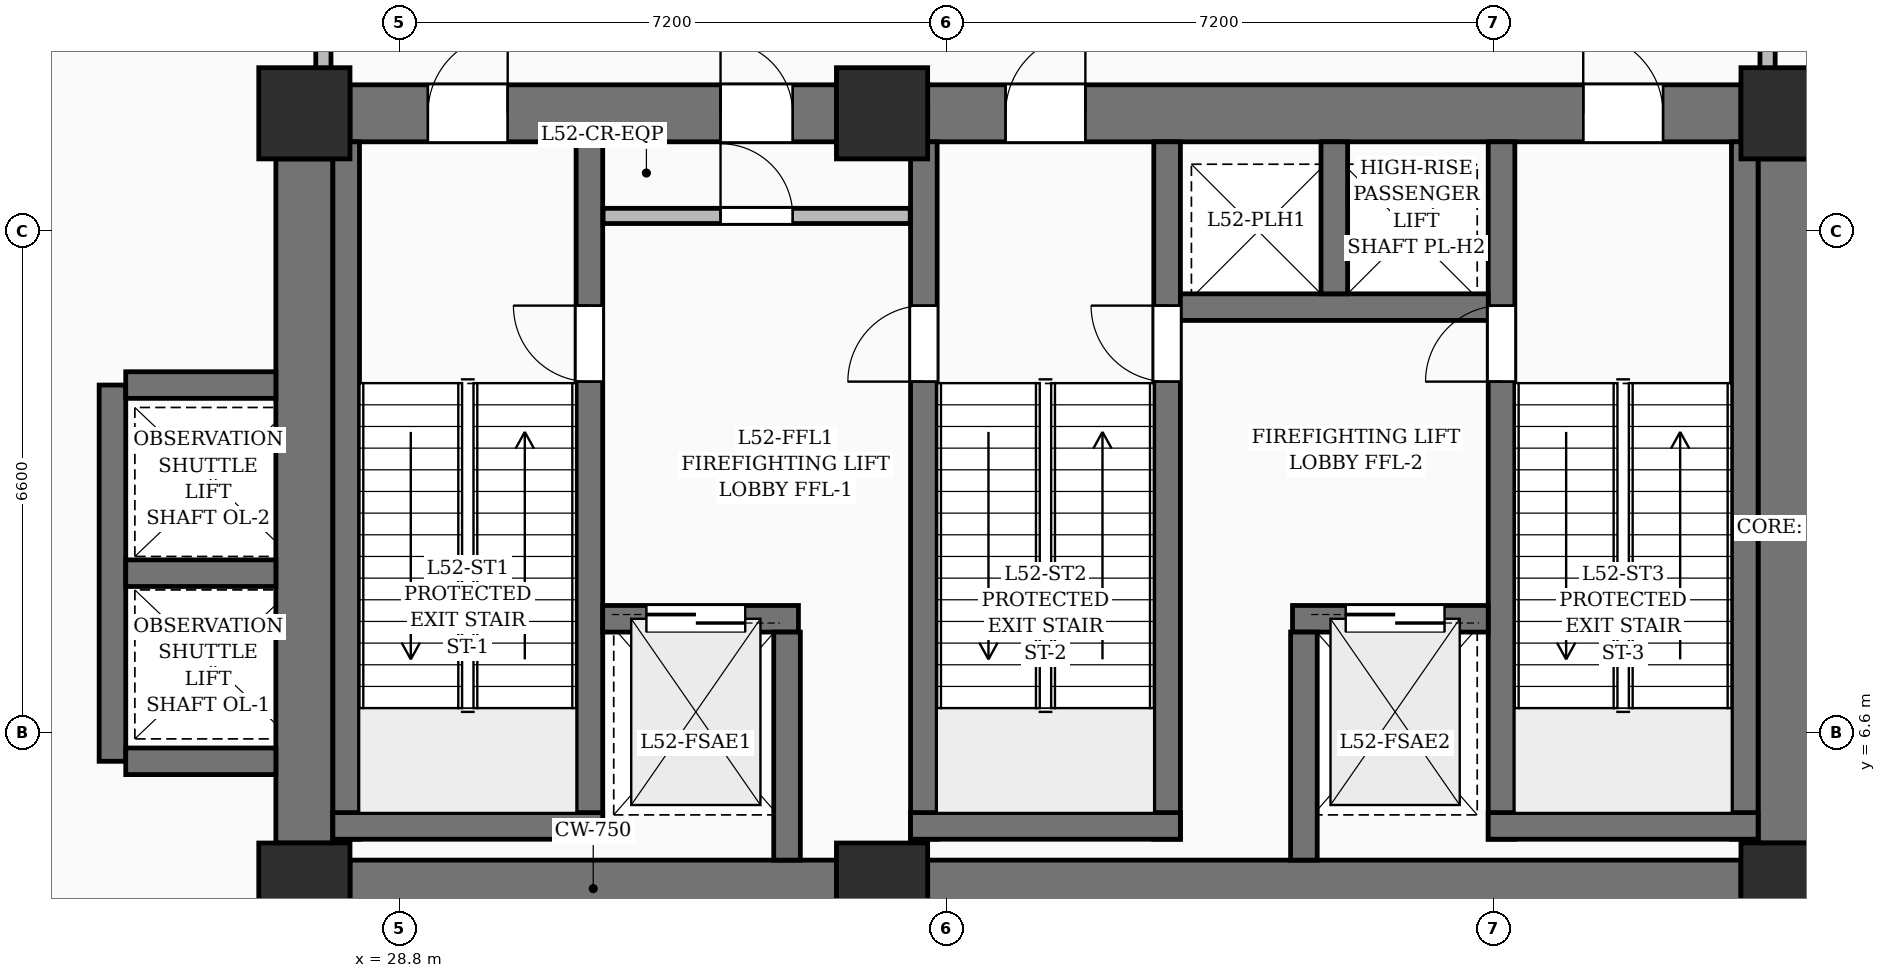
"""IFC4 building model, lengths in metres.
Left out: names, types, materials, properties, quantities, classifications, styles, units other than length and angle.
Written with IfcOpenShell. Run it as: python <this file> out.ifc"""

import sys

from ifc_helpers import new_model, si_unit, direction, frame, frame_2d, origin, origin_2d, place, context, subcontext, project, spatial, rectangle, extrude, element, fill, save


model = new_model("IFC4")
c1 = context("Model", 3, precision=1e-05, world=origin(), true_north=direction((0.0, 1.0)))
c2 = subcontext(c1, "Body", "Model", "MODEL_VIEW")
j1 = project(units=[si_unit("LENGTHUNIT", "METRE"), si_unit("PLANEANGLEUNIT", "RADIAN")], contexts=[c1])
p1 = place(None, origin())
s1 = spatial("IfcSite", under=j1, at=p1, CompositionType="ELEMENT")
p2 = place(p1, origin())
s2 = spatial("IfcBuilding", under=s1, at=p2, CompositionType="ELEMENT")
p3 = place(p2, frame((0.0, 0.0, 201.6)))
s3 = spatial("IfcBuildingStorey", under=s2, at=p3, CompositionType="ELEMENT", Elevation=201.6)
for number, where, z_axis, x_axis in (
    (1, (27.55, 4.55, 0.0), (0.0, 0.0, 1.0), (1.0, 0.0, 0.0)),
    (2, (35.15, 4.55, 0.0), (0.0, 0.0, 1.0), (1.0, 0.0, 0.0)),
    (3, (47.05, 4.55, 0.0), (0.0, 0.0, 1.0), (1.0, 0.0, 0.0)),
    (4, (27.55, 14.75, 0.0), (0.0, 0.0, 1.0), (1.0, 0.0, 0.0)),
    (5, (35.15, 14.75, 0.0), (0.0, 0.0, 1.0), (1.0, 0.0, 0.0)),
    (6, (47.05, 14.75, 0.0), (0.0, 0.0, 1.0), (1.0, 0.0, 0.0)),
):
    element("IfcColumn", number, at=place(p3, frame(where, z_axis=z_axis, x_axis=x_axis)), inside=s3, PredefinedType="COLUMN", context=c2, shape_type="SweptSolid", body=[
        extrude(rectangle(XDim=1.2, YDim=1.2, at=origin_2d()), origin(), (0.0, 0.0, 1.0), 5.4),
    ])
p4 = place(p3, frame((28.15, 4.55, 0.0), z_axis=(0.0, 0.0, 1.0), x_axis=(1.0, 0.0, 0.0)))
e7 = element("IfcWall", 7, at=p4, inside=s3, PredefinedType="SHEAR", context=c2, shape_type="SweptSolid", body=[
    extrude(rectangle(XDim=6.4, YDim=0.75, at=frame_2d((3.2, 0.0))), origin(), (0.0, 0.0, 1.0), 5.4),
])
p5 = place(p3, frame((35.75, 4.55, 0.0), z_axis=(0.0, 0.0, 1.0), x_axis=(1.0, 0.0, 0.0)))
e8 = element("IfcWall", 8, at=p5, inside=s3, PredefinedType="SHEAR", context=c2, shape_type="SweptSolid", body=[
    extrude(rectangle(XDim=10.7, YDim=0.75, at=frame_2d((5.35, 0.0))), origin(), (0.0, 0.0, 1.0), 5.4),
])
p6 = place(p3, frame((28.15, 14.75, 0.0), z_axis=(0.0, 0.0, 1.0), x_axis=(1.0, 0.0, 0.0)))
e9 = element("IfcWall", 9, at=p6, inside=s3, PredefinedType="SHEAR", context=c2, shape_type="SweptSolid", body=[
    extrude(rectangle(XDim=6.4, YDim=0.75, at=frame_2d((3.2, 0.0))), origin(), (0.0, 0.0, 1.0), 5.4),
])
p7 = place(p6, frame((1.025, 0.0, 0.0)))
e10 = element("IfcOpeningElement", 10, at=p7, cuts=e9, PredefinedType="OPENING", context=c2, shape_type="SweptSolid", body=[
    extrude(rectangle(XDim=1.05, YDim=2.15, at=frame_2d((0.525, 1.075))), frame((0.0, 0.385, 0.0), z_axis=(0.0, -1.0, 0.0), x_axis=(1.0, 0.0, 0.0)), (0.0, 0.0, 1.0), 0.77),
])
p8 = place(p6, frame((4.875, 0.0, 0.0)))
e11 = element("IfcOpeningElement", 11, at=p8, cuts=e9, PredefinedType="OPENING", context=c2, shape_type="SweptSolid", body=[
    extrude(rectangle(XDim=0.95, YDim=2.15, at=frame_2d((0.475, 1.075))), frame((0.0, 0.385, 0.0), z_axis=(0.0, -1.0, 0.0), x_axis=(1.0, 0.0, 0.0)), (0.0, 0.0, 1.0), 0.77),
])
p9 = place(p3, frame((35.75, 14.75, 0.0), z_axis=(0.0, 0.0, 1.0), x_axis=(1.0, 0.0, 0.0)))
e12 = element("IfcWall", 12, at=p9, inside=s3, PredefinedType="SHEAR", context=c2, shape_type="SweptSolid", body=[
    extrude(rectangle(XDim=10.7, YDim=0.75, at=frame_2d((5.35, 0.0))), origin(), (0.0, 0.0, 1.0), 5.4),
])
p10 = place(p9, frame((1.025, 0.0, 0.0)))
e13 = element("IfcOpeningElement", 13, at=p10, cuts=e12, PredefinedType="OPENING", context=c2, shape_type="SweptSolid", body=[
    extrude(rectangle(XDim=1.05, YDim=2.15, at=frame_2d((0.525, 1.075))), frame((0.0, 0.385, 0.0), z_axis=(0.0, -1.0, 0.0), x_axis=(1.0, 0.0, 0.0)), (0.0, 0.0, 1.0), 0.77),
])
p11 = place(p9, frame((8.625, 0.0, 0.0)))
e14 = element("IfcOpeningElement", 14, at=p11, cuts=e12, PredefinedType="OPENING", context=c2, shape_type="SweptSolid", body=[
    extrude(rectangle(XDim=1.05, YDim=2.15, at=frame_2d((0.525, 1.075))), frame((0.0, 0.385, 0.0), z_axis=(0.0, -1.0, 0.0), x_axis=(1.0, 0.0, 0.0)), (0.0, 0.0, 1.0), 0.77),
])
for number, where, z_axis, x_axis in (
    (15, (27.55, 5.15, 0.0), (0.0, 0.0, 1.0), (0.0, 1.0, 0.0)),
    (16, (47.05, 5.15, 0.0), (0.0, 0.0, 1.0), (0.0, 1.0, 0.0)),
):
    element("IfcWall", number, at=place(p3, frame(where, z_axis=z_axis, x_axis=x_axis)), inside=s3, PredefinedType="SHEAR", context=c2, shape_type="SweptSolid", body=[
        extrude(rectangle(XDim=9.0, YDim=0.75, at=frame_2d((4.5, 0.0))), origin(), (0.0, 0.0, 1.0), 5.4),
    ])
p12 = place(p3, frame((28.1, 5.2, 0.0), z_axis=(0.0, 0.0, 1.0), x_axis=(0.0, 1.0, 0.0)))
e17 = element("IfcWall", 17, at=p12, inside=s3, PredefinedType="SOLIDWALL", context=c2, shape_type="SweptSolid", body=[
    extrude(rectangle(XDim=9.175, YDim=0.35, at=frame_2d((4.587, 0.0))), origin(), (0.0, 0.0, 1.0), 5.4),
])
p13 = place(p3, frame((31.3, 5.2, 0.0), z_axis=(0.0, 0.0, 1.0), x_axis=(0.0, 1.0, 0.0)))
e18 = element("IfcWall", 18, at=p13, inside=s3, PredefinedType="SOLIDWALL", context=c2, shape_type="SweptSolid", body=[
    extrude(rectangle(XDim=9.175, YDim=0.35, at=frame_2d((4.587, 0.0))), origin(), (0.0, 0.0, 1.0), 5.4),
])
p14 = place(p13, frame((6.02, 0.0, 0.0)))
e19 = element("IfcOpeningElement", 19, at=p14, cuts=e18, PredefinedType="OPENING", context=c2, shape_type="SweptSolid", body=[
    extrude(rectangle(XDim=1.0, YDim=2.15, at=frame_2d((0.5, 1.075))), frame((0.0, 0.185, 0.0), z_axis=(0.0, -1.0, 0.0), x_axis=(1.0, 0.0, 0.0)), (0.0, 0.0, 1.0), 0.37),
])
p15 = place(p3, frame((27.925, 5.375, 0.0), z_axis=(0.0, 0.0, 1.0), x_axis=(1.0, 0.0, 0.0)))
e20 = element("IfcWall", 20, at=p15, inside=s3, PredefinedType="SOLIDWALL", context=c2, shape_type="SweptSolid", body=[
    extrude(rectangle(XDim=3.55, YDim=0.35, at=frame_2d((1.775, 0.0))), origin(), (0.0, 0.0, 1.0), 5.4),
])
p16 = place(p3, frame((35.7, 5.2, 0.0), z_axis=(0.0, 0.0, 1.0), x_axis=(0.0, 1.0, 0.0)))
e21 = element("IfcWall", 21, at=p16, inside=s3, PredefinedType="SOLIDWALL", context=c2, shape_type="SweptSolid", body=[
    extrude(rectangle(XDim=9.175, YDim=0.35, at=frame_2d((4.587, 0.0))), origin(), (0.0, 0.0, 1.0), 5.4),
])
p17 = place(p16, frame((6.02, 0.0, 0.0)))
e22 = element("IfcOpeningElement", 22, at=p17, cuts=e21, PredefinedType="OPENING", context=c2, shape_type="SweptSolid", body=[
    extrude(rectangle(XDim=1.0, YDim=2.15, at=frame_2d((0.5, 1.075))), frame((0.0, 0.185, 0.0), z_axis=(0.0, -1.0, 0.0), x_axis=(1.0, 0.0, 0.0)), (0.0, 0.0, 1.0), 0.37),
])
p18 = place(p3, frame((38.9, 5.2, 0.0), z_axis=(0.0, 0.0, 1.0), x_axis=(0.0, 1.0, 0.0)))
e23 = element("IfcWall", 23, at=p18, inside=s3, PredefinedType="SOLIDWALL", context=c2, shape_type="SweptSolid", body=[
    extrude(rectangle(XDim=9.175, YDim=0.35, at=frame_2d((4.587, 0.0))), origin(), (0.0, 0.0, 1.0), 5.4),
])
p19 = place(p18, frame((6.02, 0.0, 0.0)))
e24 = element("IfcOpeningElement", 24, at=p19, cuts=e23, PredefinedType="OPENING", context=c2, shape_type="SweptSolid", body=[
    extrude(rectangle(XDim=1.0, YDim=2.15, at=frame_2d((0.5, 1.075))), frame((0.0, 0.185, 0.0), z_axis=(0.0, -1.0, 0.0), x_axis=(1.0, 0.0, 0.0)), (0.0, 0.0, 1.0), 0.37),
])
p20 = place(p3, frame((35.525, 5.375, 0.0), z_axis=(0.0, 0.0, 1.0), x_axis=(1.0, 0.0, 0.0)))
e25 = element("IfcWall", 25, at=p20, inside=s3, PredefinedType="SOLIDWALL", context=c2, shape_type="SweptSolid", body=[
    extrude(rectangle(XDim=3.55, YDim=0.35, at=frame_2d((1.775, 0.0))), origin(), (0.0, 0.0, 1.0), 5.4),
])
p21 = place(p3, frame((43.3, 5.2, 0.0), z_axis=(0.0, 0.0, 1.0), x_axis=(0.0, 1.0, 0.0)))
e26 = element("IfcWall", 26, at=p21, inside=s3, PredefinedType="SOLIDWALL", context=c2, shape_type="SweptSolid", body=[
    extrude(rectangle(XDim=9.175, YDim=0.35, at=frame_2d((4.587, 0.0))), origin(), (0.0, 0.0, 1.0), 5.4),
])
p22 = place(p21, frame((6.02, 0.0, 0.0)))
e27 = element("IfcOpeningElement", 27, at=p22, cuts=e26, PredefinedType="OPENING", context=c2, shape_type="SweptSolid", body=[
    extrude(rectangle(XDim=1.0, YDim=2.15, at=frame_2d((0.5, 1.075))), frame((0.0, 0.185, 0.0), z_axis=(0.0, -1.0, 0.0), x_axis=(1.0, 0.0, 0.0)), (0.0, 0.0, 1.0), 0.37),
])
p23 = place(p3, frame((46.5, 5.2, 0.0), z_axis=(0.0, 0.0, 1.0), x_axis=(0.0, 1.0, 0.0)))
e28 = element("IfcWall", 28, at=p23, inside=s3, PredefinedType="SOLIDWALL", context=c2, shape_type="SweptSolid", body=[
    extrude(rectangle(XDim=9.175, YDim=0.35, at=frame_2d((4.587, 0.0))), origin(), (0.0, 0.0, 1.0), 5.4),
])
p24 = place(p3, frame((43.125, 5.375, 0.0), z_axis=(0.0, 0.0, 1.0), x_axis=(1.0, 0.0, 0.0)))
e29 = element("IfcWall", 29, at=p24, inside=s3, PredefinedType="SOLIDWALL", context=c2, shape_type="SweptSolid", body=[
    extrude(rectangle(XDim=3.55, YDim=0.35, at=frame_2d((1.775, 0.0))), origin(), (0.0, 0.0, 1.0), 5.4),
])
p25 = place(p3, frame((31.475, 8.1, 0.0), z_axis=(0.0, 0.0, 1.0), x_axis=(1.0, 0.0, 0.0)))
e30 = element("IfcWall", 30, at=p25, inside=s3, PredefinedType="SOLIDWALL", context=c2, shape_type="SweptSolid", body=[
    extrude(rectangle(XDim=2.575, YDim=0.35, at=frame_2d((1.288, 0.0))), origin(), (0.0, 0.0, 1.0), 5.4),
])
p26 = place(p25, frame((0.575, 0.0, 0.0)))
e31 = element("IfcOpeningElement", 31, at=p26, cuts=e30, PredefinedType="OPENING", context=c2, shape_type="SweptSolid", body=[
    extrude(rectangle(XDim=1.3, YDim=2.25, at=frame_2d((0.65, 1.125))), frame((0.0, 0.185, 0.0), z_axis=(0.0, -1.0, 0.0), x_axis=(1.0, 0.0, 0.0)), (0.0, 0.0, 1.0), 0.37),
])
p27 = place(p3, frame((40.55, 8.1, 0.0), z_axis=(0.0, 0.0, 1.0), x_axis=(1.0, 0.0, 0.0)))
e32 = element("IfcWall", 32, at=p27, inside=s3, PredefinedType="SOLIDWALL", context=c2, shape_type="SweptSolid", body=[
    extrude(rectangle(XDim=2.575, YDim=0.35, at=frame_2d((1.288, 0.0))), origin(), (0.0, 0.0, 1.0), 5.4),
])
p28 = place(p27, frame((0.7, 0.0, 0.0)))
e33 = element("IfcOpeningElement", 33, at=p28, cuts=e32, PredefinedType="OPENING", context=c2, shape_type="SweptSolid", body=[
    extrude(rectangle(XDim=1.3, YDim=2.25, at=frame_2d((0.65, 1.125))), frame((0.0, 0.185, 0.0), z_axis=(0.0, -1.0, 0.0), x_axis=(1.0, 0.0, 0.0)), (0.0, 0.0, 1.0), 0.37),
])
for number, where, z_axis, x_axis in (
    (34, (33.9, 4.925, 0.0), (0.0, 0.0, 1.0), (0.0, 1.0, 0.0)),
    (35, (40.7, 4.925, 0.0), (0.0, 0.0, 1.0), (0.0, 1.0, 0.0)),
):
    element("IfcWall", number, at=place(p3, frame(where, z_axis=z_axis, x_axis=x_axis)), inside=s3, PredefinedType="SOLIDWALL", context=c2, shape_type="SweptSolid", body=[
        extrude(rectangle(XDim=3.0, YDim=0.35, at=frame_2d((1.5, 0.0))), origin(), (0.0, 0.0, 1.0), 5.4),
    ])
p29 = place(p3, frame((39.075, 12.2, 0.0), z_axis=(0.0, 0.0, 1.0), x_axis=(1.0, 0.0, 0.0)))
e36 = element("IfcWall", 36, at=p29, inside=s3, PredefinedType="SOLIDWALL", context=c2, shape_type="SweptSolid", body=[
    extrude(rectangle(XDim=4.05, YDim=0.35, at=frame_2d((2.025, 0.0))), origin(), (0.0, 0.0, 1.0), 5.4),
])
p30 = place(p3, frame((41.1, 12.375, 0.0), z_axis=(0.0, 0.0, 1.0), x_axis=(0.0, 1.0, 0.0)))
e37 = element("IfcWall", 37, at=p30, inside=s3, PredefinedType="SOLIDWALL", context=c2, shape_type="SweptSolid", body=[
    extrude(rectangle(XDim=2.0, YDim=0.35, at=frame_2d((1.0, 0.0))), origin(), (0.0, 0.0, 1.0), 5.4),
])
p31 = place(p3, frame((25.025, 6.225, 0.0), z_axis=(0.0, 0.0, 1.0), x_axis=(0.0, 1.0, 0.0)))
e38 = element("IfcWall", 38, at=p31, inside=s3, PredefinedType="SOLIDWALL", context=c2, shape_type="SweptSolid", body=[
    extrude(rectangle(XDim=4.95, YDim=0.35, at=frame_2d((2.475, 0.0))), origin(), (0.0, 0.0, 1.0), 5.4),
])
for number, where, z_axis, x_axis in (
    (39, (25.2, 6.225, 0.0), (0.0, 0.0, 1.0), (1.0, 0.0, 0.0)),
    (40, (25.2, 8.7, 0.0), (0.0, 0.0, 1.0), (1.0, 0.0, 0.0)),
    (41, (25.2, 11.175, 0.0), (0.0, 0.0, 1.0), (1.0, 0.0, 0.0)),
):
    element("IfcWall", number, at=place(p3, frame(where, z_axis=z_axis, x_axis=x_axis)), inside=s3, PredefinedType="SOLIDWALL", context=c2, shape_type="SweptSolid", body=[
        extrude(rectangle(XDim=1.975, YDim=0.35, at=frame_2d((0.988, 0.0))), origin(), (0.0, 0.0, 1.0), 5.4),
    ])
p32 = place(p3, frame((22.395, 14.695, 0.0), z_axis=(0.0, 0.0, 1.0), x_axis=(0.545593263522, 0.838050112344, 0.0)))
e42 = element("IfcWall", 42, at=p32, inside=s3, PredefinedType="SOLIDWALL", context=c2, shape_type="SweptSolid", body=[
    extrude(rectangle(XDim=5.489, YDim=0.3, at=frame_2d((2.744, 0.0))), origin(), (0.0, 0.0, 1.0), 5.15),
])
p33 = place(p3, frame((14.768, 5.161, 0.0), z_axis=(0.0, 0.0, 1.0), x_axis=(0.542024449696, 0.840362716886, 0.0)))
e43 = element("IfcWall", 43, at=p33, inside=s3, PredefinedType="PARAPET", context=c2, shape_type="SweptSolid", body=[
    extrude(rectangle(XDim=21.067, YDim=0.25, at=frame_2d((10.534, 0.0))), origin(), (0.0, 0.0, 1.0), 1.15),
])
p34 = place(p3, frame((34.72, 14.75, 0.0), z_axis=(0.0, 0.0, 1.0), x_axis=(1.0, 0.0, 0.0)))
e44 = element("IfcWall", 44, at=p34, inside=s3, PredefinedType="PARTITIONING", context=c2, shape_type="SweptSolid", body=[
    extrude(rectangle(XDim=1.03, YDim=0.2, at=frame_2d((0.515, 0.0))), origin(), (0.0, 0.0, 1.0), 4.335),
])
p35 = place(p3, frame((31.48, 13.4, 0.0), z_axis=(0.0, 0.0, 1.0), x_axis=(1.0, 0.0, 0.0)))
e45 = element("IfcWall", 45, at=p35, inside=s3, PredefinedType="PARTITIONING", context=c2, shape_type="SweptSolid", body=[
    extrude(rectangle(XDim=4.04, YDim=0.2, at=frame_2d((2.02, 0.0))), origin(), (0.0, 0.0, 1.0), 5.15),
])
p36 = place(p35, frame((1.545, 0.0, 0.0)))
e46 = element("IfcOpeningElement", 46, at=p36, cuts=e45, PredefinedType="OPENING", context=c2, shape_type="SweptSolid", body=[
    extrude(rectangle(XDim=0.95, YDim=2.15, at=frame_2d((0.475, 1.075))), frame((0.0, 0.11, 0.0), z_axis=(0.0, -1.0, 0.0), x_axis=(1.0, 0.0, 0.0)), (0.0, 0.0, 1.0), 0.22),
])
p37 = place(p3, frame((46.8, 15.125, 0.0), z_axis=(0.0, 0.0, 1.0), x_axis=(0.0, 1.0, 0.0)))
e47 = element("IfcWall", 47, at=p37, inside=s3, PredefinedType="PARTITIONING", context=c2, shape_type="SweptSolid", body=[
    extrude(rectangle(XDim=2.34, YDim=0.2, at=frame_2d((1.17, 0.0))), origin(), (0.0, 0.0, 1.0), 4.335),
])
p38 = place(p37, frame((0.706, 0.0, 0.0)))
e48 = element("IfcOpeningElement", 48, at=p38, cuts=e47, PredefinedType="OPENING", context=c2, shape_type="SweptSolid", body=[
    extrude(rectangle(XDim=0.9, YDim=2.1, at=frame_2d((0.45, 1.05))), frame((0.0, 0.11, 0.0), z_axis=(0.0, -1.0, 0.0), x_axis=(1.0, 0.0, 0.0)), (0.0, 0.0, 1.0), 0.22),
])
p39 = place(p3, frame((27.8, 17.465, 0.0), z_axis=(0.0, 0.0, 1.0), x_axis=(0.0, -1.0, 0.0)))
e49 = element("IfcWall", 49, at=p39, inside=s3, PredefinedType="PARTITIONING", context=c2, shape_type="SweptSolid", body=[
    extrude(rectangle(XDim=2.34, YDim=0.2, at=frame_2d((1.17, 0.0))), origin(), (0.0, 0.0, 1.0), 5.15),
])
p40 = place(p7, origin())
e50 = element("IfcDoor", 50, at=p40, inside=s3, OperationType="SINGLE_SWING_RIGHT", PredefinedType="DOOR", context=c2, shape_type="SweptSolid", body=[
    extrude(rectangle(XDim=1.05, YDim=2.15, at=frame_2d((0.525, 1.075))), frame((0.0, 0.025, 0.0), z_axis=(0.0, -1.0, 0.0), x_axis=(1.0, 0.0, 0.0)), (0.0, 0.0, 1.0), 0.05),
])
fill(e10, e50)
p41 = place(p10, origin())
e51 = element("IfcDoor", 51, at=p41, inside=s3, OperationType="SINGLE_SWING_RIGHT", PredefinedType="DOOR", context=c2, shape_type="SweptSolid", body=[
    extrude(rectangle(XDim=1.05, YDim=2.15, at=frame_2d((0.525, 1.075))), frame((0.0, 0.025, 0.0), z_axis=(0.0, -1.0, 0.0), x_axis=(1.0, 0.0, 0.0)), (0.0, 0.0, 1.0), 0.05),
])
fill(e13, e51)
p42 = place(p11, origin())
e52 = element("IfcDoor", 52, at=p42, inside=s3, OperationType="SINGLE_SWING_LEFT", PredefinedType="DOOR", context=c2, shape_type="SweptSolid", body=[
    extrude(rectangle(XDim=1.05, YDim=2.15, at=frame_2d((0.525, 1.075))), frame((0.0, 0.025, 0.0), z_axis=(0.0, -1.0, 0.0), x_axis=(1.0, 0.0, 0.0)), (0.0, 0.0, 1.0), 0.05),
])
fill(e14, e52)
p43 = place(p14, origin())
e53 = element("IfcDoor", 53, at=p43, inside=s3, OperationType="SINGLE_SWING_RIGHT", PredefinedType="DOOR", context=c2, shape_type="SweptSolid", body=[
    extrude(rectangle(XDim=1.0, YDim=2.15, at=frame_2d((0.5, 1.075))), frame((0.0, 0.025, 0.0), z_axis=(0.0, -1.0, 0.0), x_axis=(1.0, 0.0, 0.0)), (0.0, 0.0, 1.0), 0.05),
])
fill(e19, e53)
p44 = place(p17, origin())
e54 = element("IfcDoor", 54, at=p44, inside=s3, OperationType="SINGLE_SWING_LEFT", PredefinedType="DOOR", context=c2, shape_type="SweptSolid", body=[
    extrude(rectangle(XDim=1.0, YDim=2.15, at=frame_2d((0.5, 1.075))), frame((0.0, 0.025, 0.0), z_axis=(0.0, -1.0, 0.0), x_axis=(1.0, 0.0, 0.0)), (0.0, 0.0, 1.0), 0.05),
])
fill(e22, e54)
p45 = place(p19, origin())
e55 = element("IfcDoor", 55, at=p45, inside=s3, OperationType="SINGLE_SWING_RIGHT", PredefinedType="DOOR", context=c2, shape_type="SweptSolid", body=[
    extrude(rectangle(XDim=1.0, YDim=2.15, at=frame_2d((0.5, 1.075))), frame((0.0, 0.025, 0.0), z_axis=(0.0, -1.0, 0.0), x_axis=(1.0, 0.0, 0.0)), (0.0, 0.0, 1.0), 0.05),
])
fill(e24, e55)
p46 = place(p22, origin())
e56 = element("IfcDoor", 56, at=p46, inside=s3, OperationType="SINGLE_SWING_LEFT", PredefinedType="DOOR", context=c2, shape_type="SweptSolid", body=[
    extrude(rectangle(XDim=1.0, YDim=2.15, at=frame_2d((0.5, 1.075))), frame((0.0, 0.025, 0.0), z_axis=(0.0, -1.0, 0.0), x_axis=(1.0, 0.0, 0.0)), (0.0, 0.0, 1.0), 0.05),
])
fill(e27, e56)
p47 = place(p26, origin())
e57 = element("IfcDoor", 57, at=p47, inside=s3, OperationType="DOUBLE_DOOR_SLIDING", PredefinedType="DOOR", context=c2, shape_type="SweptSolid", body=[
    extrude(rectangle(XDim=1.3, YDim=2.25, at=frame_2d((0.65, 1.125))), frame((0.0, 0.025, 0.0), z_axis=(0.0, -1.0, 0.0), x_axis=(1.0, 0.0, 0.0)), (0.0, 0.0, 1.0), 0.05),
])
fill(e31, e57)
p48 = place(p28, origin())
e58 = element("IfcDoor", 58, at=p48, inside=s3, OperationType="DOUBLE_DOOR_SLIDING", PredefinedType="DOOR", context=c2, shape_type="SweptSolid", body=[
    extrude(rectangle(XDim=1.3, YDim=2.25, at=frame_2d((0.65, 1.125))), frame((0.0, 0.025, 0.0), z_axis=(0.0, -1.0, 0.0), x_axis=(1.0, 0.0, 0.0)), (0.0, 0.0, 1.0), 0.05),
])
fill(e33, e58)
p49 = place(p36, origin())
e59 = element("IfcDoor", 59, at=p49, inside=s3, OperationType="SINGLE_SWING_LEFT", PredefinedType="DOOR", context=c2, shape_type="SweptSolid", body=[
    extrude(rectangle(XDim=0.95, YDim=2.15, at=frame_2d((0.475, 1.075))), frame((0.0, 0.025, 0.0), z_axis=(0.0, -1.0, 0.0), x_axis=(1.0, 0.0, 0.0)), (0.0, 0.0, 1.0), 0.05),
])
fill(e46, e59)
p50 = place(p8, origin())
e60 = element("IfcDoor", 60, at=p50, inside=s3, OperationType="SINGLE_SWING_LEFT", PredefinedType="DOOR", context=c2, shape_type="SweptSolid", body=[
    extrude(rectangle(XDim=0.95, YDim=2.15, at=frame_2d((0.475, 1.075))), frame((0.0, 0.025, 0.0), z_axis=(0.0, -1.0, 0.0), x_axis=(1.0, 0.0, 0.0)), (0.0, 0.0, 1.0), 0.05),
])
fill(e11, e60)
save(model, sys.argv[1])
